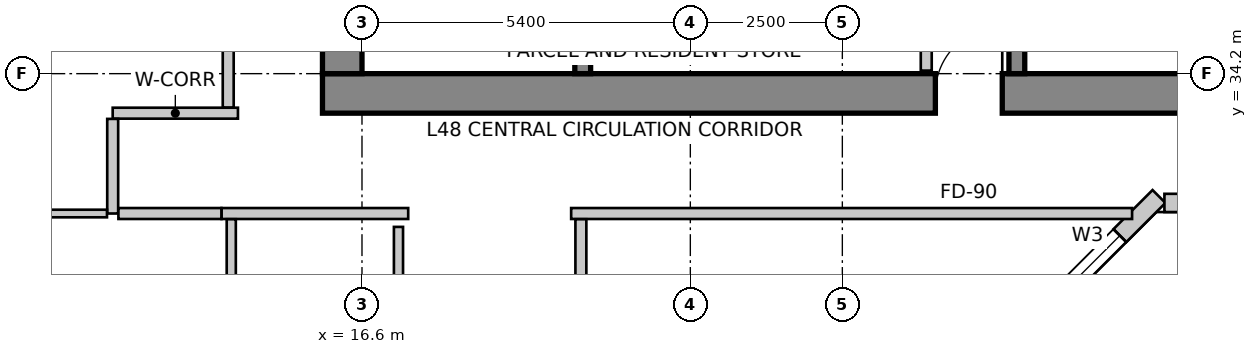
"""IFC4 building model, lengths in metres.
Left out: names, types, materials, properties, quantities, classifications, styles, units other than length and angle.
Written with IfcOpenShell. Run it as: python <this file> out.ifc"""

import sys

from ifc_helpers import new_model, si_unit, direction, frame, frame_2d, origin, place, context, subcontext, project, spatial, rectangle, extrude, source, transform, mapped, element, fill, save


model = new_model("IFC4")
c1 = context("Model", 3, precision=1e-05, world=origin(), true_north=direction((0.0, 1.0)))
c2 = subcontext(c1, "Body", "Model", "MODEL_VIEW")
j1 = project(units=[si_unit("LENGTHUNIT", "METRE"), si_unit("PLANEANGLEUNIT", "RADIAN")], contexts=[c1])
p1 = place(None, origin())
s1 = spatial("IfcSite", under=j1, at=p1, CompositionType="ELEMENT")
p2 = place(p1, origin())
s2 = spatial("IfcBuilding", under=s1, at=p2, CompositionType="ELEMENT")
p3 = place(p2, frame((0.0, 0.0, 193.9)))
s3 = spatial("IfcBuildingStorey", under=s2, at=p3, CompositionType="ELEMENT", Elevation=193.9)
p4 = place(p3, frame((15.95, 33.875, 0.0), z_axis=(0.0, 0.0, 1.0), x_axis=(1.0, 0.0, 0.0)))
e1 = element("IfcWall", 1, at=p4, inside=s3, PredefinedType="SHEAR", context=c2, shape_type="SweptSolid", body=[
    extrude(rectangle(XDim=15.7, YDim=0.65, at=frame_2d((7.85, 0.0))), origin(), (0.0, 0.0, 1.0), 3.5),
])
m1 = source(origin(), c2, "Body", "SweptSolid", [
    extrude(rectangle(XDim=1.1, YDim=2.15, at=frame_2d((0.55, 1.075))), frame((0.0, 0.335, 0.0), z_axis=(0.0, -1.0, 0.0), x_axis=(1.0, 0.0, 0.0)), (0.0, 0.0, 1.0), 0.67),
])
p5 = place(p4, frame((10.08, 0.0, 0.0)))
e2 = element("IfcOpeningElement", 2, at=p5, cuts=e1, PredefinedType="OPENING", context=c2, shape_type="MappedRepresentation", body=[
    mapped(m1, transform((0.0, 0.0, 0.0), scale=1.0)),
])
p6 = place(p3, frame((16.275, 34.2, 0.0), z_axis=(0.0, 0.0, 1.0), x_axis=(0.0, 1.0, 0.0)))
e3 = element("IfcWall", 3, at=p6, inside=s3, PredefinedType="SHEAR", context=c2, shape_type="SweptSolid", body=[
    extrude(rectangle(XDim=11.4, YDim=0.65, at=frame_2d((5.7, 0.0))), origin(), (0.0, 0.0, 1.0), 3.5),
])
p7 = place(p6, frame((7.15, 0.0, 0.0)))
e4 = element("IfcOpeningElement", 4, at=p7, cuts=e3, PredefinedType="OPENING", context=c2, shape_type="MappedRepresentation", body=[
    mapped(m1, transform((0.0, 0.0, 0.0), scale=1.0)),
])
p8 = place(p3, frame((20.23, 34.2, 0.0), z_axis=(0.0, 0.0, 1.0), x_axis=(0.0, 1.0, 0.0)))
e5 = element("IfcWall", 5, at=p8, inside=s3, PredefinedType="SHEAR", context=c2, shape_type="SweptSolid", body=[
    extrude(rectangle(XDim=9.06, YDim=0.26, at=frame_2d((4.53, 0.0))), origin(), (0.0, 0.0, 1.0), 3.5),
])
m2 = source(origin(), c2, "Body", "SweptSolid", [
    extrude(rectangle(XDim=1.1, YDim=2.15, at=frame_2d((0.55, 1.075))), frame((0.0, 0.14, 0.0), z_axis=(0.0, -1.0, 0.0), x_axis=(1.0, 0.0, 0.0)), (0.0, 0.0, 1.0), 0.28),
])
p9 = place(p8, frame((7.45, 0.0, 0.0)))
e6 = element("IfcOpeningElement", 6, at=p9, cuts=e5, PredefinedType="OPENING", context=c2, shape_type="MappedRepresentation", body=[
    mapped(m2, transform((0.0, 0.0, 0.0), scale=1.0)),
])
p10 = place(p3, frame((27.37, 34.2, 0.0), z_axis=(0.0, 0.0, 1.0), x_axis=(0.0, 1.0, 0.0)))
e7 = element("IfcWall", 7, at=p10, inside=s3, PredefinedType="SHEAR", context=c2, shape_type="SweptSolid", body=[
    extrude(rectangle(XDim=9.06, YDim=0.26, at=frame_2d((4.53, 0.0))), origin(), (0.0, 0.0, 1.0), 3.5),
])
p11 = place(p10, frame((7.45, 0.0, 0.0)))
e8 = element("IfcOpeningElement", 8, at=p11, cuts=e7, PredefinedType="OPENING", context=c2, shape_type="MappedRepresentation", body=[
    mapped(m2, transform((0.0, 0.0, 0.0), scale=1.0)),
])
p12 = place(p3, frame((27.652, 30.124, 0.0), z_axis=(0.0, 0.0, 1.0), x_axis=(0.707064797706, 0.707148762175, 0.0)))
e9 = element("IfcWall", 9, at=p12, inside=s3, PredefinedType="SOLIDWALL", context=c2, shape_type="SweptSolid", body=[
    extrude(rectangle(XDim=2.908, YDim=0.3, at=frame_2d((1.454, 0.0))), origin(), (0.0, 0.0, 1.0), 3.25),
])
m3 = source(origin(), c2, "Body", "SweptSolid", [
    extrude(rectangle(XDim=1.5, YDim=1.8, at=frame_2d((0.75, 0.9))), frame((0.0, 0.16, 0.0), z_axis=(0.0, -1.0, 0.0), x_axis=(1.0, 0.0, 0.0)), (0.0, 0.0, 1.0), 0.32),
])
p13 = place(p12, frame((0.498, 0.0, 0.85)))
e10 = element("IfcOpeningElement", 10, at=p13, cuts=e9, PredefinedType="OPENING", context=c2, shape_type="MappedRepresentation", body=[
    mapped(m3, transform((0.0, 0.0, 0.0), scale=1.0)),
])
p14 = place(p3, frame((29.797, 32.074, 0.0), z_axis=(0.0, 0.0, 1.0), x_axis=(1.0, 0.0, 0.0)))
e11 = element("IfcWall", 11, at=p14, inside=s3, PredefinedType="SOLIDWALL", context=c2, shape_type="SweptSolid", body=[
    extrude(rectangle(XDim=0.882, YDim=0.3, at=frame_2d((0.441, 0.0))), origin(), (0.0, 0.0, 1.0), 3.25),
])
p15 = place(p3, frame((13.269, 47.134, 0.0), z_axis=(0.0, 0.0, 1.0), x_axis=(-0.319920776449, -0.947444297464, 0.0)))
e12 = element("IfcWall", 12, at=p15, inside=s3, PredefinedType="SOLIDWALL", context=c2, shape_type="SweptSolid", body=[
    extrude(rectangle(XDim=16.133, YDim=0.3, at=frame_2d((8.067, 0.0))), origin(), (0.0, 0.0, 1.0), 3.25),
])
m4 = source(origin(), c2, "Body", "SweptSolid", [
    extrude(rectangle(XDim=2.4, YDim=2.2, at=frame_2d((1.2, 1.1))), frame((0.0, 0.16, 0.0), z_axis=(0.0, -1.0, 0.0), x_axis=(1.0, 0.0, 0.0)), (0.0, 0.0, 1.0), 0.32),
])
p16 = place(p15, frame((2.363, 0.0, 0.85)))
e13 = element("IfcOpeningElement", 13, at=p16, cuts=e12, PredefinedType="OPENING", context=c2, shape_type="MappedRepresentation", body=[
    mapped(m4, transform((0.0, 0.0, 0.0), scale=1.0)),
])
m5 = source(origin(), c2, "Body", "SweptSolid", [
    extrude(rectangle(XDim=2.1, YDim=2.0, at=frame_2d((1.05, 1.0))), frame((0.0, 0.16, 0.0), z_axis=(0.0, -1.0, 0.0), x_axis=(1.0, 0.0, 0.0)), (0.0, 0.0, 1.0), 0.32),
])
p17 = place(p15, frame((7.41, 0.0, 0.85)))
e14 = element("IfcOpeningElement", 14, at=p17, cuts=e12, PredefinedType="OPENING", context=c2, shape_type="MappedRepresentation", body=[
    mapped(m5, transform((0.0, 0.0, 0.0), scale=1.0)),
])
p18 = place(p15, frame((12.157, 0.0, 0.85)))
e15 = element("IfcOpeningElement", 15, at=p18, cuts=e12, PredefinedType="OPENING", context=c2, shape_type="MappedRepresentation", body=[
    mapped(m4, transform((0.0, 0.0, 0.0), scale=1.0)),
])
p19 = place(p3, frame((8.188, 31.834, 0.0), z_axis=(0.0, 0.0, 1.0), x_axis=(0.202303475707, -0.979322880217, 0.0)))
e16 = element("IfcWall", 16, at=p19, inside=s3, PredefinedType="SOLIDWALL", context=c2, shape_type="SweptSolid", body=[
    extrude(rectangle(XDim=15.766, YDim=0.3, at=frame_2d((7.883, 0.0))), origin(), (0.0, 0.0, 1.0), 3.25),
])
p20 = place(p19, frame((2.399, 0.0, 0.85)))
e17 = element("IfcOpeningElement", 17, at=p20, cuts=e16, PredefinedType="OPENING", context=c2, shape_type="MappedRepresentation", body=[
    mapped(m5, transform((0.0, 0.0, 0.0), scale=1.0)),
])
p21 = place(p19, frame((8.798, 0.0, 0.85)))
e18 = element("IfcOpeningElement", 18, at=p21, cuts=e16, PredefinedType="OPENING", context=c2, shape_type="MappedRepresentation", body=[
    mapped(m5, transform((0.0, 0.0, 0.0), scale=1.0)),
])
m6 = source(origin(), c2, "Body", "SweptSolid", [
    extrude(rectangle(XDim=1.2, YDim=1.6, at=frame_2d((0.6, 0.8))), frame((0.0, 0.16, 0.0), z_axis=(0.0, -1.0, 0.0), x_axis=(1.0, 0.0, 0.0)), (0.0, 0.0, 1.0), 0.32),
])
p22 = place(p19, frame((14.052, 0.0, 0.85)))
e19 = element("IfcOpeningElement", 19, at=p22, cuts=e16, PredefinedType="OPENING", context=c2, shape_type="MappedRepresentation", body=[
    mapped(m6, transform((0.0, 0.0, 0.0), scale=1.0)),
])
p23 = place(p3, frame((25.88, 35.956, 0.0), z_axis=(0.0, 0.0, 1.0), x_axis=(0.0, -1.0, 0.0)))
e20 = element("IfcWall", 20, at=p23, inside=s3, PredefinedType="PARTITIONING", context=c2, shape_type="SweptSolid", body=[
    extrude(rectangle(XDim=1.706, YDim=0.18, at=frame_2d((0.853, 0.0))), origin(), (0.0, 0.0, 1.0), 2.542),
])
p24 = place(p3, frame((12.5, 33.55, 0.0), z_axis=(0.0, 0.0, 1.0), x_axis=(1.0, 0.0, 0.0)))
e21 = element("IfcWall", 21, at=p24, inside=s3, PredefinedType="PARTITIONING", context=c2, shape_type="SweptSolid", body=[
    extrude(rectangle(XDim=2.06, YDim=0.18, at=frame_2d((1.03, 0.0))), origin(), (0.0, 0.0, 1.0), 3.25),
])
p25 = place(p3, frame((12.5, 31.9, 0.0), z_axis=(0.0, 0.0, 1.0), x_axis=(0.0, 1.0, 0.0)))
e22 = element("IfcWall", 22, at=p25, inside=s3, PredefinedType="PARTITIONING", context=c2, shape_type="SweptSolid", body=[
    extrude(rectangle(XDim=1.556, YDim=0.18, at=frame_2d((0.778, 0.0))), origin(), (0.0, 0.0, 1.0), 2.835),
])
p26 = place(p3, frame((17.36, 31.9, 0.0), z_axis=(0.0, 0.0, 1.0), x_axis=(-1.0, 0.0, 0.0)))
e23 = element("IfcWall", 23, at=p26, inside=s3, PredefinedType="PARTITIONING", context=c2, shape_type="SweptSolid", body=[
    extrude(rectangle(XDim=3.07, YDim=0.18, at=frame_2d((1.535, 0.0))), origin(), (0.0, 0.0, 1.0), 2.835),
])
p27 = place(p3, frame((14.288, 31.9, 0.0), z_axis=(0.0, 0.0, 1.0), x_axis=(-1.0, 0.0, 0.0)))
e24 = element("IfcWall", 24, at=p27, inside=s3, PredefinedType="PARTITIONING", context=c2, shape_type="SweptSolid", body=[
    extrude(rectangle(XDim=1.694, YDim=0.18, at=frame_2d((0.847, 0.0))), origin(), (0.0, 0.0, 1.0), 2.835),
])
p28 = place(p3, frame((29.265, 31.9, 0.0), z_axis=(0.0, 0.0, 1.0), x_axis=(-1.0, 0.0, 0.0)))
e25 = element("IfcWall", 25, at=p28, inside=s3, PredefinedType="PARTITIONING", context=c2, shape_type="SweptSolid", body=[
    extrude(rectangle(XDim=9.225, YDim=0.18, at=frame_2d((4.613, 0.0))), origin(), (0.0, 0.0, 1.0), 2.835),
])
p29 = place(p3, frame((14.4, 33.644, 0.0), z_axis=(0.0, 0.0, 1.0), x_axis=(0.0, 1.0, 0.0)))
e26 = element("IfcWall", 26, at=p29, inside=s3, PredefinedType="PARTITIONING", context=c2, shape_type="SweptSolid", body=[
    extrude(rectangle(XDim=12.606, YDim=0.18, at=frame_2d((6.303, 0.0))), origin(), (0.0, 0.0, 1.0), 3.25),
])
m7 = source(origin(), c2, "Body", "SweptSolid", [
    extrude(rectangle(XDim=0.9, YDim=2.15, at=frame_2d((0.45, 1.075))), frame((0.0, 0.1, 0.0), z_axis=(0.0, -1.0, 0.0), x_axis=(1.0, 0.0, 0.0)), (0.0, 0.0, 1.0), 0.2),
])
p30 = place(p29, frame((4.399, 0.0, 0.0)))
e27 = element("IfcOpeningElement", 27, at=p30, cuts=e26, PredefinedType="OPENING", context=c2, shape_type="MappedRepresentation", body=[
    mapped(m7, transform((0.0, 0.0, 0.0), scale=1.0)),
])
p31 = place(p3, frame((12.406, 31.9, 0.0), z_axis=(0.0, 0.0, 1.0), x_axis=(-1.0, 0.0, 0.0)))
e28 = element("IfcWall", 28, at=p31, inside=s3, PredefinedType="PARTITIONING", context=c2, shape_type="SweptSolid", body=[
    extrude(rectangle(XDim=4.115, YDim=0.125, at=frame_2d((2.057, 0.0))), origin(), (0.0, 0.0, 1.0), 2.542),
])
p32 = place(p3, frame((20.2, 31.806, 0.0), z_axis=(0.0, 0.0, 1.0), x_axis=(0.0, -1.0, 0.0)))
e29 = element("IfcWall", 29, at=p32, inside=s3, PredefinedType="PARTITIONING", context=c2, shape_type="SweptSolid", body=[
    extrude(rectangle(XDim=13.212, YDim=0.18, at=frame_2d((6.606, 0.0))), origin(), (0.0, 0.0, 1.0), 2.688),
])
p33 = place(p32, frame((6.095, 0.0, 0.0)))
e30 = element("IfcOpeningElement", 30, at=p33, cuts=e29, PredefinedType="OPENING", context=c2, shape_type="MappedRepresentation", body=[
    mapped(m7, transform((0.0, 0.0, 0.0), scale=1.0)),
])
p34 = place(p3, frame((14.45, 25.279, 0.0), z_axis=(0.0, 0.0, 1.0), x_axis=(0.0, 1.0, 0.0)))
e31 = element("IfcWall", 31, at=p34, inside=s3, PredefinedType="PARTITIONING", context=c2, shape_type="SweptSolid", body=[
    extrude(rectangle(XDim=6.527, YDim=0.15, at=frame_2d((3.263, 0.0))), origin(), (0.0, 0.0, 1.0), 2.688),
])
p35 = place(p3, frame((17.2, 31.68, 0.0), z_axis=(0.0, 0.0, 1.0), x_axis=(0.0, -1.0, 0.0)))
e32 = element("IfcWall", 32, at=p35, inside=s3, PredefinedType="PARTITIONING", context=c2, shape_type="SweptSolid", body=[
    extrude(rectangle(XDim=6.26, YDim=0.15, at=frame_2d((3.13, 0.0))), origin(), (0.0, 0.0, 1.0), 2.688),
])
m8 = source(origin(), c2, "Body", "SweptSolid", [
    extrude(rectangle(XDim=1.5, YDim=1.8, at=frame_2d((0.75, 0.9))), frame((0.0, -0.015, 0.0), z_axis=(0.0, -1.0, 0.0), x_axis=(1.0, 0.0, 0.0)), (0.0, 0.0, 1.0), 0.06),
])
p36 = place(p13, origin())
e33 = element("IfcWindow", 33, at=p36, inside=s3, PartitioningType="SINGLE_PANEL", PredefinedType="WINDOW", context=c2, shape_type="MappedRepresentation", body=[
    mapped(m8, transform((0.0, 0.0, 0.0), scale=1.0)),
])
fill(e10, e33)
m9 = source(origin(), c2, "Body", "SweptSolid", [
    extrude(rectangle(XDim=1.1, YDim=2.15, at=frame_2d((0.55, 1.075))), frame((0.0, 0.025, 0.0), z_axis=(0.0, -1.0, 0.0), x_axis=(1.0, 0.0, 0.0)), (0.0, 0.0, 1.0), 0.05),
])
p37 = place(p5, origin())
e34 = element("IfcDoor", 34, at=p37, inside=s3, OperationType="SINGLE_SWING_RIGHT", PredefinedType="DOOR", context=c2, shape_type="MappedRepresentation", body=[
    mapped(m9, transform((0.0, 0.0, 0.0), scale=1.0)),
])
fill(e2, e34)
save(model, sys.argv[1])
